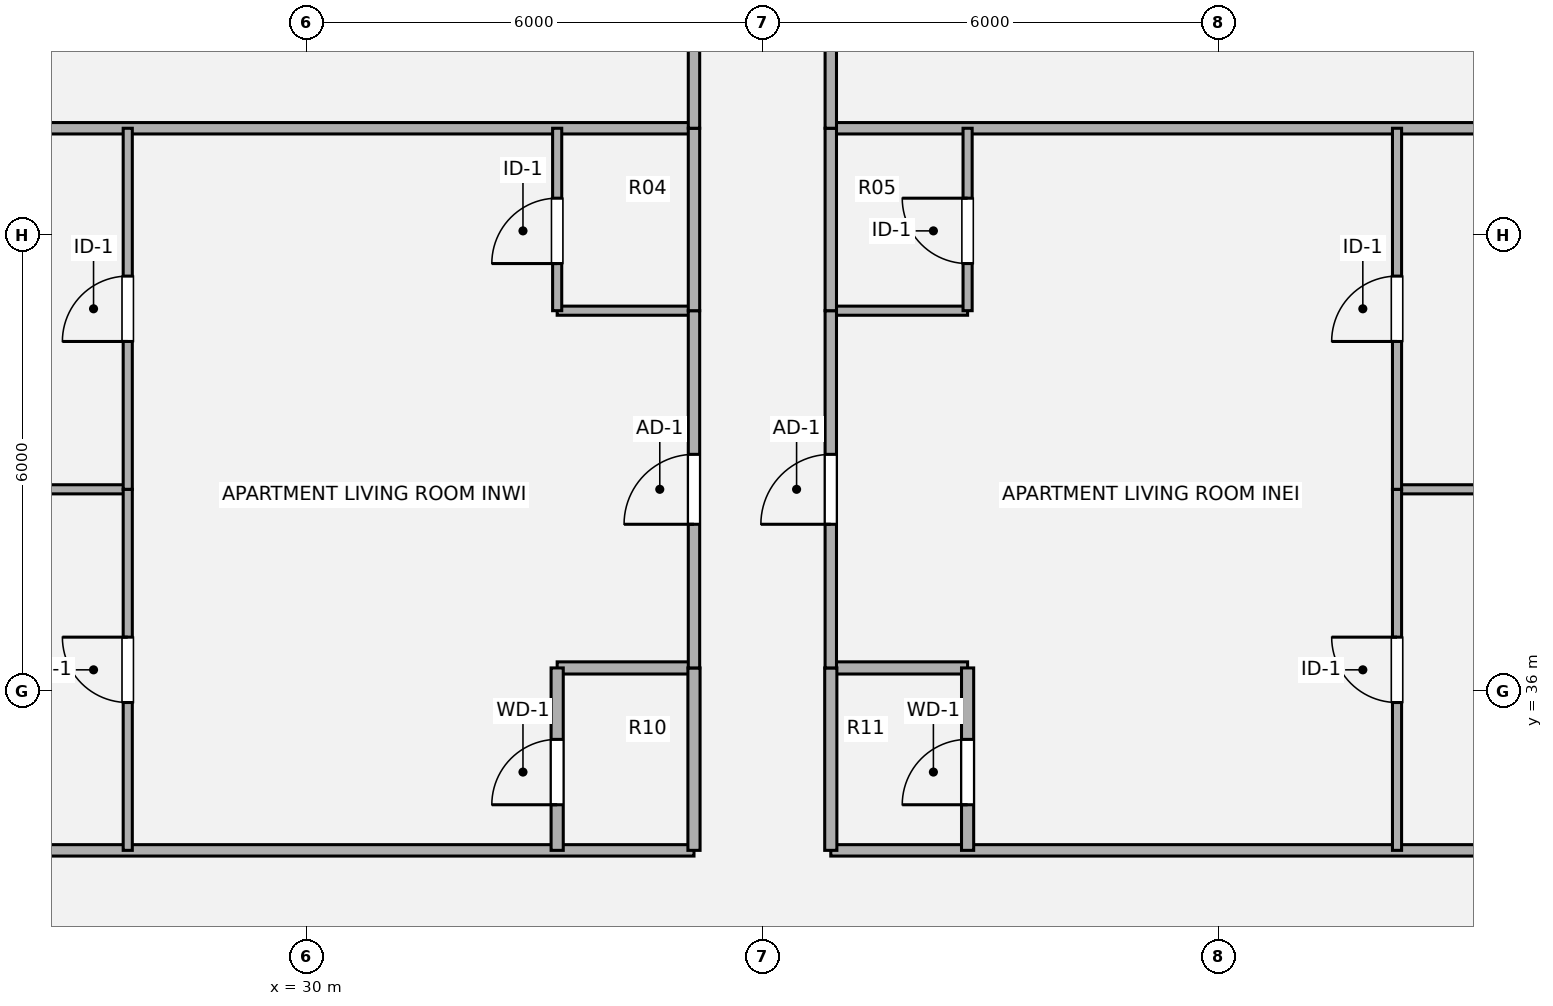
"""IFC4 building model, lengths in metres.
Left out: names, types, materials, properties, quantities, classifications, styles, units other than length and angle.
Written with IfcOpenShell. Run it as: python <this file> out.ifc"""

import sys

from ifc_helpers import new_model, si_unit, direction, frame, frame_2d, origin, origin_2d, place, context, subcontext, project, spatial, rectangle, extrude, source, transform, mapped, element, fill, save


model = new_model("IFC4")
c1 = context("Model", 3, precision=1e-05, world=origin(), true_north=direction((0.0, 1.0)))
c2 = subcontext(c1, "Body", "Model", "MODEL_VIEW")
j1 = project(units=[si_unit("LENGTHUNIT", "METRE"), si_unit("PLANEANGLEUNIT", "RADIAN")], contexts=[c1])
p1 = place(None, origin())
s1 = spatial("IfcSite", under=j1, at=p1, CompositionType="ELEMENT")
p2 = place(p1, origin())
s2 = spatial("IfcBuilding", under=s1, at=p2, CompositionType="ELEMENT")
p3 = place(p2, frame((0.0, 0.0, 97.38)))
s3 = spatial("IfcBuildingStorey", under=s2, at=p3, CompositionType="ELEMENT", Elevation=97.38)
for number, where, z_axis, x_axis in (
    (1, (24.0, 33.9, 0.0), (0.0, 0.0, 1.0), (1.0, 0.0, 0.0)),
    (2, (36.9, 33.9, 0.0), (0.0, 0.0, 1.0), (1.0, 0.0, 0.0)),
):
    element("IfcWall", number, at=place(p3, frame(where, z_axis=z_axis, x_axis=x_axis)), inside=s3, PredefinedType="PARTITIONING", context=c2, shape_type="SweptSolid", body=[
        extrude(rectangle(XDim=11.1, YDim=0.15, at=frame_2d((5.55, 0.0))), origin(), (0.0, 0.0, 1.0), 2.982),
    ])
for number, where, z_axis, x_axis in (
    (3, (33.3, 36.3, 0.0), (0.0, 0.0, 1.0), (1.0, 0.0, 0.0)),
    (4, (36.9, 36.3, 0.0), (0.0, 0.0, 1.0), (1.0, 0.0, 0.0)),
):
    element("IfcWall", number, at=place(p3, frame(where, z_axis=z_axis, x_axis=x_axis)), inside=s3, PredefinedType="PLUMBINGWALL", context=c2, shape_type="SweptSolid", body=[
        extrude(rectangle(XDim=1.8, YDim=0.16, at=frame_2d((0.9, 0.0))), origin(), (0.0, 0.0, 1.0), 3.259),
    ])
for number, where, z_axis, x_axis in (
    (5, (24.0, 38.65, 0.0), (0.0, 0.0, 1.0), (1.0, 0.0, 0.0)),
    (6, (44.35, 38.65, 0.0), (0.0, 0.0, 1.0), (1.0, 0.0, 0.0)),
):
    element("IfcWall", number, at=place(p3, frame(where, z_axis=z_axis, x_axis=x_axis)), inside=s3, PredefinedType="PARTITIONING", context=c2, shape_type="SweptSolid", body=[
        extrude(rectangle(XDim=3.65, YDim=0.12, at=frame_2d((1.825, 0.0))), origin(), (0.0, 0.0, 1.0), 2.903),
    ])
for number, where, z_axis, x_axis in (
    (7, (33.3, 41.0, 0.0), (0.0, 0.0, 1.0), (1.0, 0.0, 0.0)),
    (8, (36.9, 41.0, 0.0), (0.0, 0.0, 1.0), (1.0, 0.0, 0.0)),
):
    element("IfcWall", number, at=place(p3, frame(where, z_axis=z_axis, x_axis=x_axis)), inside=s3, PredefinedType="PARTITIONING", context=c2, shape_type="SweptSolid", body=[
        extrude(rectangle(XDim=1.8, YDim=0.12, at=frame_2d((0.9, 0.0))), origin(), (0.0, 0.0, 1.0), 3.259),
    ])
for number, where, z_axis, x_axis in (
    (9, (24.0, 43.4, 0.0), (0.0, 0.0, 1.0), (1.0, 0.0, 0.0)),
    (10, (36.9, 43.4, 0.0), (0.0, 0.0, 1.0), (1.0, 0.0, 0.0)),
):
    element("IfcWall", number, at=place(p3, frame(where, z_axis=z_axis, x_axis=x_axis)), inside=s3, PredefinedType="PARTITIONING", context=c2, shape_type="SweptSolid", body=[
        extrude(rectangle(XDim=11.1, YDim=0.15, at=frame_2d((5.55, 0.0))), origin(), (0.0, 0.0, 1.0), 3.308),
    ])
p4 = place(p3, frame((27.65, 33.9, 0.0), z_axis=(0.0, 0.0, 1.0), x_axis=(0.0, 1.0, 0.0)))
e11 = element("IfcWall", 11, at=p4, inside=s3, PredefinedType="PARTITIONING", context=c2, shape_type="SweptSolid", body=[
    extrude(rectangle(XDim=4.75, YDim=0.12, at=frame_2d((2.375, 0.0))), origin(), (0.0, 0.0, 1.0), 3.5),
])
p5 = place(p4, frame((1.945, 0.0, 0.0)))
e12 = element("IfcOpeningElement", 12, at=p5, cuts=e11, PredefinedType="OPENING", context=c2, shape_type="SweptSolid", body=[
    extrude(rectangle(XDim=0.86, YDim=2.1, at=origin_2d()), frame((0.43, 0.07, 1.05), z_axis=(0.0, -1.0, 0.0), x_axis=(1.0, 0.0, 0.0)), (0.0, 0.0, 1.0), 0.14),
])
p6 = place(p3, frame((27.65, 38.65, 0.0), z_axis=(0.0, 0.0, 1.0), x_axis=(0.0, 1.0, 0.0)))
e13 = element("IfcWall", 13, at=p6, inside=s3, PredefinedType="PARTITIONING", context=c2, shape_type="SweptSolid", body=[
    extrude(rectangle(XDim=4.75, YDim=0.12, at=frame_2d((2.375, 0.0))), origin(), (0.0, 0.0, 1.0), 3.5),
])
p7 = place(p6, frame((1.945, 0.0, 0.0)))
e14 = element("IfcOpeningElement", 14, at=p7, cuts=e13, PredefinedType="OPENING", context=c2, shape_type="SweptSolid", body=[
    extrude(rectangle(XDim=0.86, YDim=2.1, at=origin_2d()), frame((0.43, 0.07, 1.05), z_axis=(0.0, -1.0, 0.0), x_axis=(1.0, 0.0, 0.0)), (0.0, 0.0, 1.0), 0.14),
])
p8 = place(p3, frame((33.3, 33.9, 0.0), z_axis=(0.0, 0.0, 1.0), x_axis=(0.0, 1.0, 0.0)))
e15 = element("IfcWall", 15, at=p8, inside=s3, PredefinedType="PLUMBINGWALL", context=c2, shape_type="SweptSolid", body=[
    extrude(rectangle(XDim=2.4, YDim=0.16, at=frame_2d((1.2, 0.0))), origin(), (0.0, 0.0, 1.0), 3.5),
])
p9 = place(p8, frame((0.6, 0.0, 0.0)))
e16 = element("IfcOpeningElement", 16, at=p9, cuts=e15, PredefinedType="OPENING", context=c2, shape_type="SweptSolid", body=[
    extrude(rectangle(XDim=0.86, YDim=2.1, at=origin_2d()), frame((0.43, 0.09, 1.05), z_axis=(0.0, -1.0, 0.0), x_axis=(1.0, 0.0, 0.0)), (0.0, 0.0, 1.0), 0.18),
])
p10 = place(p3, frame((33.3, 41.0, 0.0), z_axis=(0.0, 0.0, 1.0), x_axis=(0.0, 1.0, 0.0)))
e17 = element("IfcWall", 17, at=p10, inside=s3, PredefinedType="PARTITIONING", context=c2, shape_type="SweptSolid", body=[
    extrude(rectangle(XDim=2.4, YDim=0.12, at=frame_2d((1.2, 0.0))), origin(), (0.0, 0.0, 1.0), 3.5),
])
p11 = place(p10, frame((0.62, 0.0, 0.0)))
e18 = element("IfcOpeningElement", 18, at=p11, cuts=e17, PredefinedType="OPENING", context=c2, shape_type="SweptSolid", body=[
    extrude(rectangle(XDim=0.86, YDim=2.1, at=origin_2d()), frame((0.43, 0.07, 1.05), z_axis=(0.0, -1.0, 0.0), x_axis=(1.0, 0.0, 0.0)), (0.0, 0.0, 1.0), 0.14),
])
p12 = place(p3, frame((35.1, 33.9, 0.0), z_axis=(0.0, 0.0, 1.0), x_axis=(0.0, 1.0, 0.0)))
e19 = element("IfcWall", 19, at=p12, inside=s3, PredefinedType="PLUMBINGWALL", context=c2, shape_type="SweptSolid", body=[
    extrude(rectangle(XDim=2.4, YDim=0.16, at=frame_2d((1.2, 0.0))), origin(), (0.0, 0.0, 1.0), 3.5),
])
p13 = place(p3, frame((35.1, 36.3, 0.0), z_axis=(0.0, 0.0, 1.0), x_axis=(0.0, 1.0, 0.0)))
e20 = element("IfcWall", 20, at=p13, inside=s3, PredefinedType="PARTITIONING", context=c2, shape_type="SweptSolid", body=[
    extrude(rectangle(XDim=4.7, YDim=0.15, at=frame_2d((2.35, 0.0))), origin(), (0.0, 0.0, 1.0), 3.5),
])
p14 = place(p13, frame((1.89, 0.0, 0.0)))
e21 = element("IfcOpeningElement", 21, at=p14, cuts=e20, PredefinedType="OPENING", context=c2, shape_type="SweptSolid", body=[
    extrude(rectangle(XDim=0.92, YDim=2.1, at=origin_2d()), frame((0.46, 0.085, 1.05), z_axis=(0.0, -1.0, 0.0), x_axis=(1.0, 0.0, 0.0)), (0.0, 0.0, 1.0), 0.17),
])
p15 = place(p3, frame((35.1, 41.0, 0.0), z_axis=(0.0, 0.0, 1.0), x_axis=(0.0, 1.0, 0.0)))
e22 = element("IfcWall", 22, at=p15, inside=s3, PredefinedType="PARTITIONING", context=c2, shape_type="SweptSolid", body=[
    extrude(rectangle(XDim=2.4, YDim=0.15, at=frame_2d((1.2, 0.0))), origin(), (0.0, 0.0, 1.0), 3.5),
])
p16 = place(p3, frame((35.1, 43.4, 0.0), z_axis=(0.0, 0.0, 1.0), x_axis=(0.0, 1.0, 0.0)))
e23 = element("IfcWall", 23, at=p16, inside=s3, PredefinedType="PARTITIONING", context=c2, shape_type="SweptSolid", body=[
    extrude(rectangle(XDim=3.3, YDim=0.15, at=frame_2d((1.65, 0.0))), origin(), (0.0, 0.0, 1.0), 3.5),
])
p17 = place(p16, frame((1.34, 0.0, 0.0)))
e24 = element("IfcOpeningElement", 24, at=p17, cuts=e23, PredefinedType="OPENING", context=c2, shape_type="SweptSolid", body=[
    extrude(rectangle(XDim=0.86, YDim=2.1, at=origin_2d()), frame((0.43, 0.085, 1.05), z_axis=(0.0, -1.0, 0.0), x_axis=(1.0, 0.0, 0.0)), (0.0, 0.0, 1.0), 0.17),
])
p18 = place(p3, frame((36.9, 33.9, 0.0), z_axis=(0.0, 0.0, 1.0), x_axis=(0.0, 1.0, 0.0)))
e25 = element("IfcWall", 25, at=p18, inside=s3, PredefinedType="PLUMBINGWALL", context=c2, shape_type="SweptSolid", body=[
    extrude(rectangle(XDim=2.4, YDim=0.16, at=frame_2d((1.2, 0.0))), origin(), (0.0, 0.0, 1.0), 3.5),
])
p19 = place(p3, frame((36.9, 36.3, 0.0), z_axis=(0.0, 0.0, 1.0), x_axis=(0.0, 1.0, 0.0)))
e26 = element("IfcWall", 26, at=p19, inside=s3, PredefinedType="PARTITIONING", context=c2, shape_type="SweptSolid", body=[
    extrude(rectangle(XDim=4.7, YDim=0.15, at=frame_2d((2.35, 0.0))), origin(), (0.0, 0.0, 1.0), 3.5),
])
p20 = place(p19, frame((1.89, 0.0, 0.0)))
e27 = element("IfcOpeningElement", 27, at=p20, cuts=e26, PredefinedType="OPENING", context=c2, shape_type="SweptSolid", body=[
    extrude(rectangle(XDim=0.92, YDim=2.1, at=origin_2d()), frame((0.46, 0.085, 1.05), z_axis=(0.0, -1.0, 0.0), x_axis=(1.0, 0.0, 0.0)), (0.0, 0.0, 1.0), 0.17),
])
p21 = place(p3, frame((36.9, 41.0, 0.0), z_axis=(0.0, 0.0, 1.0), x_axis=(0.0, 1.0, 0.0)))
e28 = element("IfcWall", 28, at=p21, inside=s3, PredefinedType="PARTITIONING", context=c2, shape_type="SweptSolid", body=[
    extrude(rectangle(XDim=2.4, YDim=0.15, at=frame_2d((1.2, 0.0))), origin(), (0.0, 0.0, 1.0), 3.5),
])
p22 = place(p3, frame((36.9, 43.4, 0.0), z_axis=(0.0, 0.0, 1.0), x_axis=(0.0, 1.0, 0.0)))
e29 = element("IfcWall", 29, at=p22, inside=s3, PredefinedType="PARTITIONING", context=c2, shape_type="SweptSolid", body=[
    extrude(rectangle(XDim=3.3, YDim=0.15, at=frame_2d((1.65, 0.0))), origin(), (0.0, 0.0, 1.0), 3.5),
])
p23 = place(p22, frame((1.34, 0.0, 0.0)))
e30 = element("IfcOpeningElement", 30, at=p23, cuts=e29, PredefinedType="OPENING", context=c2, shape_type="SweptSolid", body=[
    extrude(rectangle(XDim=0.86, YDim=2.1, at=origin_2d()), frame((0.43, 0.085, 1.05), z_axis=(0.0, -1.0, 0.0), x_axis=(1.0, 0.0, 0.0)), (0.0, 0.0, 1.0), 0.17),
])
p24 = place(p3, frame((38.7, 33.9, 0.0), z_axis=(0.0, 0.0, 1.0), x_axis=(0.0, 1.0, 0.0)))
e31 = element("IfcWall", 31, at=p24, inside=s3, PredefinedType="PLUMBINGWALL", context=c2, shape_type="SweptSolid", body=[
    extrude(rectangle(XDim=2.4, YDim=0.16, at=frame_2d((1.2, 0.0))), origin(), (0.0, 0.0, 1.0), 3.5),
])
p25 = place(p24, frame((0.6, 0.0, 0.0)))
e32 = element("IfcOpeningElement", 32, at=p25, cuts=e31, PredefinedType="OPENING", context=c2, shape_type="SweptSolid", body=[
    extrude(rectangle(XDim=0.86, YDim=2.1, at=origin_2d()), frame((0.43, 0.09, 1.05), z_axis=(0.0, -1.0, 0.0), x_axis=(1.0, 0.0, 0.0)), (0.0, 0.0, 1.0), 0.18),
])
p26 = place(p3, frame((38.7, 41.0, 0.0), z_axis=(0.0, 0.0, 1.0), x_axis=(0.0, 1.0, 0.0)))
e33 = element("IfcWall", 33, at=p26, inside=s3, PredefinedType="PARTITIONING", context=c2, shape_type="SweptSolid", body=[
    extrude(rectangle(XDim=2.4, YDim=0.12, at=frame_2d((1.2, 0.0))), origin(), (0.0, 0.0, 1.0), 3.5),
])
p27 = place(p26, frame((0.62, 0.0, 0.0)))
e34 = element("IfcOpeningElement", 34, at=p27, cuts=e33, PredefinedType="OPENING", context=c2, shape_type="SweptSolid", body=[
    extrude(rectangle(XDim=0.86, YDim=2.1, at=origin_2d()), frame((0.43, 0.07, 1.05), z_axis=(0.0, -1.0, 0.0), x_axis=(1.0, 0.0, 0.0)), (0.0, 0.0, 1.0), 0.14),
])
p28 = place(p3, frame((44.35, 33.9, 0.0), z_axis=(0.0, 0.0, 1.0), x_axis=(0.0, 1.0, 0.0)))
e35 = element("IfcWall", 35, at=p28, inside=s3, PredefinedType="PARTITIONING", context=c2, shape_type="SweptSolid", body=[
    extrude(rectangle(XDim=4.75, YDim=0.12, at=frame_2d((2.375, 0.0))), origin(), (0.0, 0.0, 1.0), 3.5),
])
p29 = place(p28, frame((1.945, 0.0, 0.0)))
e36 = element("IfcOpeningElement", 36, at=p29, cuts=e35, PredefinedType="OPENING", context=c2, shape_type="SweptSolid", body=[
    extrude(rectangle(XDim=0.86, YDim=2.1, at=origin_2d()), frame((0.43, 0.07, 1.05), z_axis=(0.0, -1.0, 0.0), x_axis=(1.0, 0.0, 0.0)), (0.0, 0.0, 1.0), 0.14),
])
p30 = place(p3, frame((44.35, 38.65, 0.0), z_axis=(0.0, 0.0, 1.0), x_axis=(0.0, 1.0, 0.0)))
e37 = element("IfcWall", 37, at=p30, inside=s3, PredefinedType="PARTITIONING", context=c2, shape_type="SweptSolid", body=[
    extrude(rectangle(XDim=4.75, YDim=0.12, at=frame_2d((2.375, 0.0))), origin(), (0.0, 0.0, 1.0), 3.5),
])
p31 = place(p30, frame((1.945, 0.0, 0.0)))
e38 = element("IfcOpeningElement", 38, at=p31, cuts=e37, PredefinedType="OPENING", context=c2, shape_type="SweptSolid", body=[
    extrude(rectangle(XDim=0.86, YDim=2.1, at=origin_2d()), frame((0.43, 0.07, 1.05), z_axis=(0.0, -1.0, 0.0), x_axis=(1.0, 0.0, 0.0)), (0.0, 0.0, 1.0), 0.14),
])
m1 = source(origin(), c2, "Body", "SweptSolid", [
    extrude(rectangle(XDim=0.86, YDim=2.1, at=origin_2d()), frame((0.43, 0.025, 1.05), z_axis=(0.0, -1.0, 0.0), x_axis=(1.0, 0.0, 0.0)), (0.0, 0.0, 1.0), 0.05),
])
p32 = place(p5, origin())
e39 = element("IfcDoor", 39, at=p32, inside=s3, OperationType="SINGLE_SWING_RIGHT", PredefinedType="DOOR", context=c2, shape_type="MappedRepresentation", body=[
    mapped(m1, transform((0.0, 0.0, 0.0), x_axis=(1.0, 0.0, 0.0), y_axis=(0.0, 1.0, 0.0), z_axis=(0.0, 0.0, 1.0), scale=1.0)),
])
fill(e12, e39)
p33 = place(p7, origin())
e40 = element("IfcDoor", 40, at=p33, inside=s3, OperationType="SINGLE_SWING_LEFT", PredefinedType="DOOR", context=c2, shape_type="MappedRepresentation", body=[
    mapped(m1, transform((0.0, 0.0, 0.0), x_axis=(1.0, 0.0, 0.0), y_axis=(0.0, 1.0, 0.0), z_axis=(0.0, 0.0, 1.0), scale=1.0)),
])
fill(e14, e40)
m2 = source(origin(), c2, "Body", "SweptSolid", [
    extrude(rectangle(XDim=0.86, YDim=2.1, at=origin_2d()), frame((0.43, 0.025, 1.05), z_axis=(0.0, -1.0, 0.0), x_axis=(1.0, 0.0, 0.0)), (0.0, 0.0, 1.0), 0.05),
])
p34 = place(p9, origin())
e41 = element("IfcDoor", 41, at=p34, inside=s3, OperationType="SINGLE_SWING_LEFT", PredefinedType="DOOR", context=c2, shape_type="MappedRepresentation", body=[
    mapped(m2, transform((0.0, 0.0, 0.0), x_axis=(1.0, 0.0, 0.0), y_axis=(0.0, 1.0, 0.0), z_axis=(0.0, 0.0, 1.0), scale=1.0)),
])
fill(e16, e41)
p35 = place(p11, origin())
e42 = element("IfcDoor", 42, at=p35, inside=s3, OperationType="SINGLE_SWING_LEFT", PredefinedType="DOOR", context=c2, shape_type="MappedRepresentation", body=[
    mapped(m1, transform((0.0, 0.0, 0.0), x_axis=(1.0, 0.0, 0.0), y_axis=(0.0, 1.0, 0.0), z_axis=(0.0, 0.0, 1.0), scale=1.0)),
])
fill(e18, e42)
m3 = source(origin(), c2, "Body", "SweptSolid", [
    extrude(rectangle(XDim=0.92, YDim=2.1, at=origin_2d()), frame((0.46, 0.025, 1.05), z_axis=(0.0, -1.0, 0.0), x_axis=(1.0, 0.0, 0.0)), (0.0, 0.0, 1.0), 0.05),
])
p36 = place(p14, origin())
e43 = element("IfcDoor", 43, at=p36, inside=s3, OperationType="SINGLE_SWING_LEFT", PredefinedType="DOOR", context=c2, shape_type="MappedRepresentation", body=[
    mapped(m3, transform((0.0, 0.0, 0.0), x_axis=(1.0, 0.0, 0.0), y_axis=(0.0, 1.0, 0.0), z_axis=(0.0, 0.0, 1.0), scale=1.0)),
])
fill(e21, e43)
p37 = place(p20, origin())
e44 = element("IfcDoor", 44, at=p37, inside=s3, OperationType="SINGLE_SWING_LEFT", PredefinedType="DOOR", context=c2, shape_type="MappedRepresentation", body=[
    mapped(m3, transform((0.0, 0.0, 0.0), x_axis=(1.0, 0.0, 0.0), y_axis=(0.0, 1.0, 0.0), z_axis=(0.0, 0.0, 1.0), scale=1.0)),
])
fill(e27, e44)
p38 = place(p25, origin())
e45 = element("IfcDoor", 45, at=p38, inside=s3, OperationType="SINGLE_SWING_LEFT", PredefinedType="DOOR", context=c2, shape_type="MappedRepresentation", body=[
    mapped(m2, transform((0.0, 0.0, 0.0), x_axis=(1.0, 0.0, 0.0), y_axis=(0.0, 1.0, 0.0), z_axis=(0.0, 0.0, 1.0), scale=1.0)),
])
fill(e32, e45)
p39 = place(p27, origin())
e46 = element("IfcDoor", 46, at=p39, inside=s3, OperationType="SINGLE_SWING_RIGHT", PredefinedType="DOOR", context=c2, shape_type="MappedRepresentation", body=[
    mapped(m1, transform((0.0, 0.0, 0.0), x_axis=(1.0, 0.0, 0.0), y_axis=(0.0, 1.0, 0.0), z_axis=(0.0, 0.0, 1.0), scale=1.0)),
])
fill(e34, e46)
p40 = place(p29, origin())
e47 = element("IfcDoor", 47, at=p40, inside=s3, OperationType="SINGLE_SWING_RIGHT", PredefinedType="DOOR", context=c2, shape_type="MappedRepresentation", body=[
    mapped(m1, transform((0.0, 0.0, 0.0), x_axis=(1.0, 0.0, 0.0), y_axis=(0.0, 1.0, 0.0), z_axis=(0.0, 0.0, 1.0), scale=1.0)),
])
fill(e36, e47)
p41 = place(p31, origin())
e48 = element("IfcDoor", 48, at=p41, inside=s3, OperationType="SINGLE_SWING_LEFT", PredefinedType="DOOR", context=c2, shape_type="MappedRepresentation", body=[
    mapped(m1, transform((0.0, 0.0, 0.0), x_axis=(1.0, 0.0, 0.0), y_axis=(0.0, 1.0, 0.0), z_axis=(0.0, 0.0, 1.0), scale=1.0)),
])
fill(e38, e48)
save(model, sys.argv[1])
